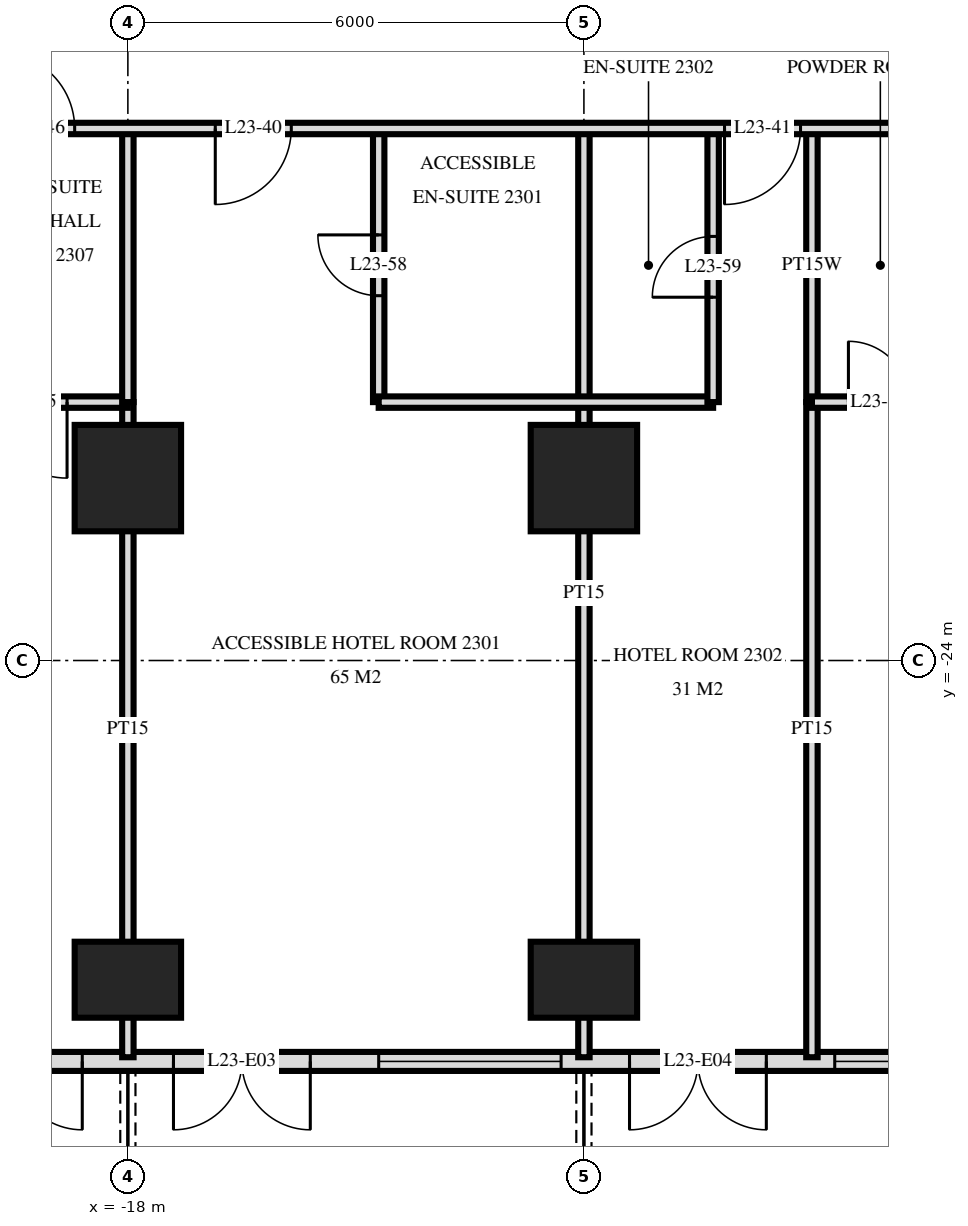
"""IFC4 building model, lengths in metres.
Left out: names, types, materials, properties, quantities, classifications, styles, units other than length and angle.
Written with IfcOpenShell. Run it as: python <this file> out.ifc"""

import sys

from ifc_helpers import new_model, si_unit, direction, frame, frame_2d, origin, origin_2d, place, context, subcontext, project, spatial, rectangle, extrude, element, fill, save


model = new_model("IFC4")
c1 = context("Model", 3, precision=1e-05, world=origin(), true_north=direction((0.0, 1.0)))
c2 = subcontext(c1, "Body", "Model", "MODEL_VIEW")
j1 = project(units=[si_unit("LENGTHUNIT", "METRE"), si_unit("PLANEANGLEUNIT", "RADIAN")], contexts=[c1])
p1 = place(None, origin())
s1 = spatial("IfcSite", under=j1, at=p1, CompositionType="ELEMENT")
p2 = place(p1, origin())
s2 = spatial("IfcBuilding", under=s1, at=p2, CompositionType="ELEMENT")
p3 = place(p2, frame((0.0, 0.0, 92.4)))
s3 = spatial("IfcBuildingStorey", under=s2, at=p3, CompositionType="ELEMENT", Elevation=92.4)
p4 = place(p3, frame((-18.0, -28.2, 0.0), z_axis=(0.0, 0.0, 1.0), x_axis=(1.0, 0.0, 0.0)))
e1 = element("IfcColumn", 1, at=p4, inside=s3, PredefinedType="COLUMN", context=c2, shape_type="SweptSolid", body=[
    extrude(rectangle(XDim=1.4, YDim=1.0, at=origin_2d()), origin(), (0.0, 0.0, 1.0), 3.6),
])
p5 = place(p3, frame((-18.0, -21.6, 0.0), z_axis=(0.0, 0.0, 1.0), x_axis=(1.0, 0.0, 0.0)))
e2 = element("IfcColumn", 2, at=p5, inside=s3, PredefinedType="COLUMN", context=c2, shape_type="SweptSolid", body=[
    extrude(rectangle(XDim=1.4, YDim=1.4, at=origin_2d()), origin(), (0.0, 0.0, 1.0), 3.6),
])
p6 = place(p3, frame((-12.0, -28.2, 0.0), z_axis=(0.0, 0.0, 1.0), x_axis=(1.0, 0.0, 0.0)))
e3 = element("IfcColumn", 3, at=p6, inside=s3, PredefinedType="COLUMN", context=c2, shape_type="SweptSolid", body=[
    extrude(rectangle(XDim=1.4, YDim=1.0, at=origin_2d()), origin(), (0.0, 0.0, 1.0), 3.6),
])
p7 = place(p3, frame((-12.0, -21.6, 0.0), z_axis=(0.0, 0.0, 1.0), x_axis=(1.0, 0.0, 0.0)))
e4 = element("IfcColumn", 4, at=p7, inside=s3, PredefinedType="COLUMN", context=c2, shape_type="SweptSolid", body=[
    extrude(rectangle(XDim=1.4, YDim=1.4, at=origin_2d()), origin(), (0.0, 0.0, 1.0), 3.6),
])
p8 = place(p3, frame((-28.775, -29.275, 0.0), z_axis=(0.0, 0.0, 1.0), x_axis=(1.0, 0.0, 0.0)))
e5 = element("IfcWall", 5, at=p8, inside=s3, PredefinedType="SOLIDWALL", context=c2, shape_type="SweptSolid", body=[
    extrude(rectangle(XDim=57.551, YDim=0.25, at=frame_2d((28.775, 0.0))), origin(), (0.0, 0.0, 1.0), 3.32),
])
p9 = place(p8, frame((0.575, 0.0, 0.0)))
e6 = element("IfcOpeningElement", 6, at=p9, cuts=e5, PredefinedType="OPENING", context=c2, shape_type="SweptSolid", body=[
    extrude(rectangle(XDim=1.8, YDim=2.4, at=frame_2d((0.9, 1.2))), frame((0.0, 0.135, 0.0), z_axis=(0.0, -1.0, 0.0), x_axis=(1.0, 0.0, 0.0)), (0.0, 0.0, 1.0), 0.27),
])
p10 = place(p8, frame((5.075, 0.0, 0.3)))
e7 = element("IfcOpeningElement", 7, at=p10, cuts=e5, PredefinedType="OPENING", context=c2, shape_type="SweptSolid", body=[
    extrude(rectangle(XDim=2.4, YDim=2.1, at=frame_2d((1.2, 1.05))), frame((0.0, 0.135, 0.0), z_axis=(0.0, -1.0, 0.0), x_axis=(1.0, 0.0, 0.0)), (0.0, 0.0, 1.0), 0.27),
])
p11 = place(p8, frame((8.375, 0.0, 0.0)))
e8 = element("IfcOpeningElement", 8, at=p11, cuts=e5, PredefinedType="OPENING", context=c2, shape_type="SweptSolid", body=[
    extrude(rectangle(XDim=1.8, YDim=2.4, at=frame_2d((0.9, 1.2))), frame((0.0, 0.135, 0.0), z_axis=(0.0, -1.0, 0.0), x_axis=(1.0, 0.0, 0.0)), (0.0, 0.0, 1.0), 0.27),
])
p12 = place(p8, frame((11.375, 0.0, 0.0)))
e9 = element("IfcOpeningElement", 9, at=p12, cuts=e5, PredefinedType="OPENING", context=c2, shape_type="SweptSolid", body=[
    extrude(rectangle(XDim=1.8, YDim=2.4, at=frame_2d((0.9, 1.2))), frame((0.0, 0.135, 0.0), z_axis=(0.0, -1.0, 0.0), x_axis=(1.0, 0.0, 0.0)), (0.0, 0.0, 1.0), 0.27),
])
p13 = place(p8, frame((14.075, 0.0, 0.3)))
e10 = element("IfcOpeningElement", 10, at=p13, cuts=e5, PredefinedType="OPENING", context=c2, shape_type="SweptSolid", body=[
    extrude(rectangle(XDim=2.4, YDim=2.1, at=frame_2d((1.2, 1.05))), frame((0.0, 0.135, 0.0), z_axis=(0.0, -1.0, 0.0), x_axis=(1.0, 0.0, 0.0)), (0.0, 0.0, 1.0), 0.27),
])
p14 = place(p8, frame((17.375, 0.0, 0.0)))
e11 = element("IfcOpeningElement", 11, at=p14, cuts=e5, PredefinedType="OPENING", context=c2, shape_type="SweptSolid", body=[
    extrude(rectangle(XDim=1.8, YDim=2.4, at=frame_2d((0.9, 1.2))), frame((0.0, 0.135, 0.0), z_axis=(0.0, -1.0, 0.0), x_axis=(1.0, 0.0, 0.0)), (0.0, 0.0, 1.0), 0.27),
])
p15 = place(p8, frame((20.075, 0.0, 0.3)))
e12 = element("IfcOpeningElement", 12, at=p15, cuts=e5, PredefinedType="OPENING", context=c2, shape_type="SweptSolid", body=[
    extrude(rectangle(XDim=2.4, YDim=2.1, at=frame_2d((1.2, 1.05))), frame((0.0, 0.135, 0.0), z_axis=(0.0, -1.0, 0.0), x_axis=(1.0, 0.0, 0.0)), (0.0, 0.0, 1.0), 0.27),
])
p16 = place(p8, frame((23.075, 0.0, 0.3)))
e13 = element("IfcOpeningElement", 13, at=p16, cuts=e5, PredefinedType="OPENING", context=c2, shape_type="SweptSolid", body=[
    extrude(rectangle(XDim=2.4, YDim=2.1, at=frame_2d((1.2, 1.05))), frame((0.0, 0.135, 0.0), z_axis=(0.0, -1.0, 0.0), x_axis=(1.0, 0.0, 0.0)), (0.0, 0.0, 1.0), 0.27),
])
p17 = place(p8, frame((26.375, 0.0, 0.0)))
e14 = element("IfcOpeningElement", 14, at=p17, cuts=e5, PredefinedType="OPENING", context=c2, shape_type="SweptSolid", body=[
    extrude(rectangle(XDim=1.8, YDim=2.4, at=frame_2d((0.9, 1.2))), frame((0.0, 0.135, 0.0), z_axis=(0.0, -1.0, 0.0), x_axis=(1.0, 0.0, 0.0)), (0.0, 0.0, 1.0), 0.27),
])
p18 = place(p8, frame((29.375, 0.0, 0.0)))
e15 = element("IfcOpeningElement", 15, at=p18, cuts=e5, PredefinedType="OPENING", context=c2, shape_type="SweptSolid", body=[
    extrude(rectangle(XDim=1.8, YDim=2.4, at=frame_2d((0.9, 1.2))), frame((0.0, 0.135, 0.0), z_axis=(0.0, -1.0, 0.0), x_axis=(1.0, 0.0, 0.0)), (0.0, 0.0, 1.0), 0.27),
])
p19 = place(p8, frame((32.075, 0.0, 0.3)))
e16 = element("IfcOpeningElement", 16, at=p19, cuts=e5, PredefinedType="OPENING", context=c2, shape_type="SweptSolid", body=[
    extrude(rectangle(XDim=2.4, YDim=2.1, at=frame_2d((1.2, 1.05))), frame((0.0, 0.135, 0.0), z_axis=(0.0, -1.0, 0.0), x_axis=(1.0, 0.0, 0.0)), (0.0, 0.0, 1.0), 0.27),
])
p20 = place(p8, frame((35.375, 0.0, 0.0)))
e17 = element("IfcOpeningElement", 17, at=p20, cuts=e5, PredefinedType="OPENING", context=c2, shape_type="SweptSolid", body=[
    extrude(rectangle(XDim=1.8, YDim=2.4, at=frame_2d((0.9, 1.2))), frame((0.0, 0.135, 0.0), z_axis=(0.0, -1.0, 0.0), x_axis=(1.0, 0.0, 0.0)), (0.0, 0.0, 1.0), 0.27),
])
p21 = place(p8, frame((38.075, 0.0, 0.3)))
e18 = element("IfcOpeningElement", 18, at=p21, cuts=e5, PredefinedType="OPENING", context=c2, shape_type="SweptSolid", body=[
    extrude(rectangle(XDim=2.4, YDim=2.1, at=frame_2d((1.2, 1.05))), frame((0.0, 0.135, 0.0), z_axis=(0.0, -1.0, 0.0), x_axis=(1.0, 0.0, 0.0)), (0.0, 0.0, 1.0), 0.27),
])
p22 = place(p8, frame((41.075, 0.0, 0.3)))
e19 = element("IfcOpeningElement", 19, at=p22, cuts=e5, PredefinedType="OPENING", context=c2, shape_type="SweptSolid", body=[
    extrude(rectangle(XDim=2.4, YDim=2.1, at=frame_2d((1.2, 1.05))), frame((0.0, 0.135, 0.0), z_axis=(0.0, -1.0, 0.0), x_axis=(1.0, 0.0, 0.0)), (0.0, 0.0, 1.0), 0.27),
])
p23 = place(p8, frame((44.375, 0.0, 0.0)))
e20 = element("IfcOpeningElement", 20, at=p23, cuts=e5, PredefinedType="OPENING", context=c2, shape_type="SweptSolid", body=[
    extrude(rectangle(XDim=1.8, YDim=2.4, at=frame_2d((0.9, 1.2))), frame((0.0, 0.135, 0.0), z_axis=(0.0, -1.0, 0.0), x_axis=(1.0, 0.0, 0.0)), (0.0, 0.0, 1.0), 0.27),
])
p24 = place(p8, frame((47.075, 0.0, 0.3)))
e21 = element("IfcOpeningElement", 21, at=p24, cuts=e5, PredefinedType="OPENING", context=c2, shape_type="SweptSolid", body=[
    extrude(rectangle(XDim=2.4, YDim=2.1, at=frame_2d((1.2, 1.05))), frame((0.0, 0.135, 0.0), z_axis=(0.0, -1.0, 0.0), x_axis=(1.0, 0.0, 0.0)), (0.0, 0.0, 1.0), 0.27),
])
p25 = place(p8, frame((50.375, 0.0, 0.0)))
e22 = element("IfcOpeningElement", 22, at=p25, cuts=e5, PredefinedType="OPENING", context=c2, shape_type="SweptSolid", body=[
    extrude(rectangle(XDim=1.8, YDim=2.4, at=frame_2d((0.9, 1.2))), frame((0.0, 0.135, 0.0), z_axis=(0.0, -1.0, 0.0), x_axis=(1.0, 0.0, 0.0)), (0.0, 0.0, 1.0), 0.27),
])
p26 = place(p8, frame((53.375, 0.0, 0.0)))
e23 = element("IfcOpeningElement", 23, at=p26, cuts=e5, PredefinedType="OPENING", context=c2, shape_type="SweptSolid", body=[
    extrude(rectangle(XDim=1.8, YDim=2.4, at=frame_2d((0.9, 1.2))), frame((0.0, 0.135, 0.0), z_axis=(0.0, -1.0, 0.0), x_axis=(1.0, 0.0, 0.0)), (0.0, 0.0, 1.0), 0.27),
])
p27 = place(p3, frame((-9.0, -29.22, 0.0), z_axis=(0.0, 0.0, 1.0), x_axis=(0.0, 1.0, 0.0)))
e24 = element("IfcWall", 24, at=p27, inside=s3, PredefinedType="PARTITIONING", context=c2, shape_type="SweptSolid", body=[
    extrude(rectangle(XDim=8.62, YDim=0.15, at=frame_2d((4.31, 0.0))), origin(), (0.0, 0.0, 1.0), 3.32),
])
p28 = place(p3, frame((-9.0, -20.6, 0.0), z_axis=(0.0, 0.0, 1.0), x_axis=(0.0, 1.0, 0.0)))
e25 = element("IfcWall", 25, at=p28, inside=s3, PredefinedType="PLUMBINGWALL", context=c2, shape_type="SweptSolid", body=[
    extrude(rectangle(XDim=3.6, YDim=0.15, at=frame_2d((1.8, 0.0))), origin(), (0.0, 0.0, 1.0), 3.32),
])
p29 = place(p3, frame((-10.3, -20.6, 0.0), z_axis=(0.0, 0.0, 1.0), x_axis=(0.0, 1.0, 0.0)))
e26 = element("IfcWall", 26, at=p29, inside=s3, PredefinedType="PARTITIONING", context=c2, shape_type="SweptSolid", body=[
    extrude(rectangle(XDim=3.6, YDim=0.15, at=frame_2d((1.8, 0.0))), origin(), (0.0, 0.0, 1.0), 3.32),
])
p30 = place(p29, frame((1.38, 0.0, 0.0)))
e27 = element("IfcOpeningElement", 27, at=p30, cuts=e26, PredefinedType="OPENING", context=c2, shape_type="SweptSolid", body=[
    extrude(rectangle(XDim=0.8, YDim=2.1, at=frame_2d((0.4, 1.05))), frame((0.0, 0.085, 0.0), z_axis=(0.0, -1.0, 0.0), x_axis=(1.0, 0.0, 0.0)), (0.0, 0.0, 1.0), 0.17),
])
p31 = place(p3, frame((-12.0, -29.22, 0.0), z_axis=(0.0, 0.0, 1.0), x_axis=(0.0, 1.0, 0.0)))
e28 = element("IfcWall", 28, at=p31, inside=s3, PredefinedType="PARTITIONING", context=c2, shape_type="SweptSolid", body=[
    extrude(rectangle(XDim=12.22, YDim=0.15, at=frame_2d((6.11, 0.0))), origin(), (0.0, 0.0, 1.0), 3.32),
])
p32 = place(p3, frame((-14.7, -20.6, 0.0), z_axis=(0.0, 0.0, 1.0), x_axis=(0.0, 1.0, 0.0)))
e29 = element("IfcWall", 29, at=p32, inside=s3, PredefinedType="PARTITIONING", context=c2, shape_type="SweptSolid", body=[
    extrude(rectangle(XDim=3.6, YDim=0.15, at=frame_2d((1.8, 0.0))), origin(), (0.0, 0.0, 1.0), 3.32),
])
p33 = place(p32, frame((1.4, 0.0, 0.0)))
e30 = element("IfcOpeningElement", 30, at=p33, cuts=e29, PredefinedType="OPENING", context=c2, shape_type="SweptSolid", body=[
    extrude(rectangle(XDim=0.8, YDim=2.1, at=frame_2d((0.4, 1.05))), frame((0.0, 0.085, 0.0), z_axis=(0.0, -1.0, 0.0), x_axis=(1.0, 0.0, 0.0)), (0.0, 0.0, 1.0), 0.17),
])
p34 = place(p3, frame((-18.0, -20.6, 0.0), z_axis=(0.0, 0.0, 1.0), x_axis=(0.0, 1.0, 0.0)))
e31 = element("IfcWall", 31, at=p34, inside=s3, PredefinedType="PARTITIONING", context=c2, shape_type="SweptSolid", body=[
    extrude(rectangle(XDim=3.6, YDim=0.15, at=frame_2d((1.8, 0.0))), origin(), (0.0, 0.0, 1.0), 3.32),
])
p35 = place(p3, frame((-18.0, -29.22, 0.0), z_axis=(0.0, 0.0, 1.0), x_axis=(0.0, 1.0, 0.0)))
e32 = element("IfcWall", 32, at=p35, inside=s3, PredefinedType="PARTITIONING", context=c2, shape_type="SweptSolid", body=[
    extrude(rectangle(XDim=8.62, YDim=0.15, at=frame_2d((4.31, 0.0))), origin(), (0.0, 0.0, 1.0), 3.32),
])
p36 = place(p3, frame((-20.4, -20.6, 0.0), z_axis=(0.0, 0.0, 1.0), x_axis=(1.0, 0.0, 0.0)))
e33 = element("IfcWall", 33, at=p36, inside=s3, PredefinedType="PARTITIONING", context=c2, shape_type="SweptSolid", body=[
    extrude(rectangle(XDim=2.4, YDim=0.15, at=frame_2d((1.2, 0.0))), origin(), (0.0, 0.0, 1.0), 3.32),
])
p37 = place(p36, frame((0.6, 0.0, 0.0)))
e34 = element("IfcOpeningElement", 34, at=p37, cuts=e33, PredefinedType="OPENING", context=c2, shape_type="SweptSolid", body=[
    extrude(rectangle(XDim=1.0, YDim=2.1, at=frame_2d((0.5, 1.05))), frame((0.0, 0.085, 0.0), z_axis=(0.0, -1.0, 0.0), x_axis=(1.0, 0.0, 0.0)), (0.0, 0.0, 1.0), 0.17),
])
p38 = place(p3, frame((-14.7, -20.6, 0.0), z_axis=(0.0, 0.0, 1.0), x_axis=(1.0, 0.0, 0.0)))
e35 = element("IfcWall", 35, at=p38, inside=s3, PredefinedType="PARTITIONING", context=c2, shape_type="SweptSolid", body=[
    extrude(rectangle(XDim=4.4, YDim=0.15, at=frame_2d((2.2, 0.0))), origin(), (0.0, 0.0, 1.0), 3.32),
])
p39 = place(p3, frame((-9.0, -20.6, 0.0), z_axis=(0.0, 0.0, 1.0), x_axis=(1.0, 0.0, 0.0)))
e36 = element("IfcWall", 36, at=p39, inside=s3, PredefinedType="PLUMBINGWALL", context=c2, shape_type="SweptSolid", body=[
    extrude(rectangle(XDim=1.8, YDim=0.15, at=frame_2d((0.9, 0.0))), origin(), (0.0, 0.0, 1.0), 3.32),
])
p40 = place(p39, frame((0.48, 0.0, 0.0)))
e37 = element("IfcOpeningElement", 37, at=p40, cuts=e36, PredefinedType="OPENING", context=c2, shape_type="SweptSolid", body=[
    extrude(rectangle(XDim=0.8, YDim=2.1, at=frame_2d((0.4, 1.05))), frame((0.0, 0.085, 0.0), z_axis=(0.0, -1.0, 0.0), x_axis=(1.0, 0.0, 0.0)), (0.0, 0.0, 1.0), 0.17),
])
p41 = place(p3, frame((-33.12, -17.0, 0.0), z_axis=(0.0, 0.0, 1.0), x_axis=(1.0, 0.0, 0.0)))
e38 = element("IfcWall", 38, at=p41, inside=s3, PredefinedType="PARTITIONING", context=c2, shape_type="SweptSolid", body=[
    extrude(rectangle(XDim=66.24, YDim=0.15, at=frame_2d((33.12, 0.0))), origin(), (0.0, 0.0, 1.0), 3.32),
])
p42 = place(p41, frame((16.27, 0.0, 0.0)))
e39 = element("IfcOpeningElement", 39, at=p42, cuts=e38, PredefinedType="OPENING", context=c2, shape_type="SweptSolid", body=[
    extrude(rectangle(XDim=1.0, YDim=2.1, at=frame_2d((0.5, 1.05))), frame((0.0, 0.085, 0.0), z_axis=(0.0, -1.0, 0.0), x_axis=(1.0, 0.0, 0.0)), (0.0, 0.0, 1.0), 0.17),
])
p43 = place(p41, frame((22.97, 0.0, 0.0)))
e40 = element("IfcOpeningElement", 40, at=p43, cuts=e38, PredefinedType="OPENING", context=c2, shape_type="SweptSolid", body=[
    extrude(rectangle(XDim=1.0, YDim=2.1, at=frame_2d((0.5, 1.05))), frame((0.0, 0.085, 0.0), z_axis=(0.0, -1.0, 0.0), x_axis=(1.0, 0.0, 0.0)), (0.0, 0.0, 1.0), 0.17),
])
p44 = place(p41, frame((34.42, 0.0, 0.0)))
e41 = element("IfcOpeningElement", 41, at=p44, cuts=e38, PredefinedType="OPENING", context=c2, shape_type="SweptSolid", body=[
    extrude(rectangle(XDim=1.0, YDim=2.1, at=frame_2d((0.5, 1.05))), frame((0.0, 0.085, 0.0), z_axis=(0.0, -1.0, 0.0), x_axis=(1.0, 0.0, 0.0)), (0.0, 0.0, 1.0), 0.17),
])
p45 = place(p41, frame((39.22, 0.0, 0.0)))
e42 = element("IfcOpeningElement", 42, at=p45, cuts=e38, PredefinedType="OPENING", context=c2, shape_type="SweptSolid", body=[
    extrude(rectangle(XDim=1.0, YDim=2.1, at=frame_2d((0.5, 1.05))), frame((0.0, 0.085, 0.0), z_axis=(0.0, -1.0, 0.0), x_axis=(1.0, 0.0, 0.0)), (0.0, 0.0, 1.0), 0.17),
])
p46 = place(p41, frame((42.27, 0.0, 0.0)))
e43 = element("IfcOpeningElement", 43, at=p46, cuts=e38, PredefinedType="OPENING", context=c2, shape_type="SweptSolid", body=[
    extrude(rectangle(XDim=1.0, YDim=2.1, at=frame_2d((0.5, 1.05))), frame((0.0, 0.085, 0.0), z_axis=(0.0, -1.0, 0.0), x_axis=(1.0, 0.0, 0.0)), (0.0, 0.0, 1.0), 0.17),
])
p47 = place(p41, frame((45.82, 0.0, 0.0)))
e44 = element("IfcOpeningElement", 44, at=p47, cuts=e38, PredefinedType="OPENING", context=c2, shape_type="SweptSolid", body=[
    extrude(rectangle(XDim=1.0, YDim=2.1, at=frame_2d((0.5, 1.05))), frame((0.0, 0.085, 0.0), z_axis=(0.0, -1.0, 0.0), x_axis=(1.0, 0.0, 0.0)), (0.0, 0.0, 1.0), 0.17),
])
p48 = place(p41, frame((13.42, 0.0, 0.0)))
e45 = element("IfcOpeningElement", 45, at=p48, cuts=e38, PredefinedType="OPENING", context=c2, shape_type="SweptSolid", body=[
    extrude(rectangle(XDim=1.0, YDim=2.1, at=frame_2d((0.5, 1.05))), frame((0.0, 0.085, 0.0), z_axis=(0.0, -1.0, 0.0), x_axis=(1.0, 0.0, 0.0)), (0.0, 0.0, 1.0), 0.17),
])
p49 = place(p41, frame((54.82, 0.0, 0.0)))
e46 = element("IfcOpeningElement", 46, at=p49, cuts=e38, PredefinedType="OPENING", context=c2, shape_type="SweptSolid", body=[
    extrude(rectangle(XDim=1.0, YDim=2.1, at=frame_2d((0.5, 1.05))), frame((0.0, 0.085, 0.0), z_axis=(0.0, -1.0, 0.0), x_axis=(1.0, 0.0, 0.0)), (0.0, 0.0, 1.0), 0.17),
])
p50 = place(p11, frame((0.9, 0.0, 0.0), z_axis=(0.0, 0.0, 1.0), x_axis=(-1.0, 0.0, 0.0)))
e47 = element("IfcDoor", 47, at=p50, inside=s3, OperationType="DOUBLE_DOOR_SINGLE_SWING", PredefinedType="DOOR", context=c2, shape_type="SweptSolid", body=[
    extrude(rectangle(XDim=1.8, YDim=2.4, at=frame_2d((0.0, 1.2))), frame((0.0, -0.025, 0.0), z_axis=(0.0, 1.0, 0.0), x_axis=(-1.0, 0.0, 0.0)), (0.0, 0.0, 1.0), 0.05),
])
fill(e8, e47)
p51 = place(p12, frame((0.9, 0.0, 0.0), z_axis=(0.0, 0.0, 1.0), x_axis=(-1.0, 0.0, 0.0)))
e48 = element("IfcDoor", 48, at=p51, inside=s3, OperationType="DOUBLE_DOOR_SINGLE_SWING", PredefinedType="DOOR", context=c2, shape_type="SweptSolid", body=[
    extrude(rectangle(XDim=1.8, YDim=2.4, at=frame_2d((0.0, 1.2))), frame((0.0, -0.025, 0.0), z_axis=(0.0, 1.0, 0.0), x_axis=(-1.0, 0.0, 0.0)), (0.0, 0.0, 1.0), 0.05),
])
fill(e9, e48)
p52 = place(p13, origin())
e49 = element("IfcWindow", 49, at=p52, inside=s3, PartitioningType="SINGLE_PANEL", PredefinedType="WINDOW", context=c2, shape_type="SweptSolid", body=[
    extrude(rectangle(XDim=2.4, YDim=2.1, at=frame_2d((1.2, 1.05))), frame((0.0, 0.03, 0.0), z_axis=(0.0, -1.0, 0.0), x_axis=(1.0, 0.0, 0.0)), (0.0, 0.0, 1.0), 0.06),
])
fill(e10, e49)
p53 = place(p14, frame((0.9, 0.0, 0.0), z_axis=(0.0, 0.0, 1.0), x_axis=(-1.0, 0.0, 0.0)))
e50 = element("IfcDoor", 50, at=p53, inside=s3, OperationType="DOUBLE_DOOR_SINGLE_SWING", PredefinedType="DOOR", context=c2, shape_type="SweptSolid", body=[
    extrude(rectangle(XDim=1.8, YDim=2.4, at=frame_2d((0.0, 1.2))), frame((0.0, -0.025, 0.0), z_axis=(0.0, 1.0, 0.0), x_axis=(-1.0, 0.0, 0.0)), (0.0, 0.0, 1.0), 0.05),
])
fill(e11, e50)
p54 = place(p15, origin())
e51 = element("IfcWindow", 51, at=p54, inside=s3, PartitioningType="SINGLE_PANEL", PredefinedType="WINDOW", context=c2, shape_type="SweptSolid", body=[
    extrude(rectangle(XDim=2.4, YDim=2.1, at=frame_2d((1.2, 1.05))), frame((0.0, 0.03, 0.0), z_axis=(0.0, -1.0, 0.0), x_axis=(1.0, 0.0, 0.0)), (0.0, 0.0, 1.0), 0.06),
])
fill(e12, e51)
p55 = place(p42, frame((0.5, 0.0, 0.0), z_axis=(0.0, 0.0, 1.0), x_axis=(-1.0, 0.0, 0.0)))
e52 = element("IfcDoor", 52, at=p55, inside=s3, OperationType="SINGLE_SWING_LEFT", PredefinedType="DOOR", context=c2, shape_type="SweptSolid", body=[
    extrude(rectangle(XDim=1.0, YDim=2.1, at=frame_2d((0.0, 1.05))), frame((0.0, -0.025, 0.0), z_axis=(0.0, 1.0, 0.0), x_axis=(-1.0, 0.0, 0.0)), (0.0, 0.0, 1.0), 0.05),
])
fill(e39, e52)
p56 = place(p43, frame((0.5, 0.0, 0.0), z_axis=(0.0, 0.0, 1.0), x_axis=(-1.0, 0.0, 0.0)))
e53 = element("IfcDoor", 53, at=p56, inside=s3, OperationType="SINGLE_SWING_LEFT", PredefinedType="DOOR", context=c2, shape_type="SweptSolid", body=[
    extrude(rectangle(XDim=1.0, YDim=2.1, at=frame_2d((0.0, 1.05))), frame((0.0, -0.025, 0.0), z_axis=(0.0, 1.0, 0.0), x_axis=(-1.0, 0.0, 0.0)), (0.0, 0.0, 1.0), 0.05),
])
fill(e40, e53)
p57 = place(p48, origin())
e54 = element("IfcDoor", 54, at=p57, inside=s3, OperationType="SINGLE_SWING_RIGHT", PredefinedType="DOOR", context=c2, shape_type="SweptSolid", body=[
    extrude(rectangle(XDim=1.0, YDim=2.1, at=frame_2d((0.5, 1.05))), frame((0.0, 0.025, 0.0), z_axis=(0.0, -1.0, 0.0), x_axis=(1.0, 0.0, 0.0)), (0.0, 0.0, 1.0), 0.05),
])
fill(e45, e54)
p58 = place(p33, origin())
e55 = element("IfcDoor", 55, at=p58, inside=s3, OperationType="SINGLE_SWING_LEFT", PredefinedType="DOOR", context=c2, shape_type="SweptSolid", body=[
    extrude(rectangle(XDim=0.8, YDim=2.1, at=frame_2d((0.4, 1.05))), frame((0.0, 0.025, 0.0), z_axis=(0.0, -1.0, 0.0), x_axis=(1.0, 0.0, 0.0)), (0.0, 0.0, 1.0), 0.05),
])
fill(e30, e55)
p59 = place(p30, origin())
e56 = element("IfcDoor", 56, at=p59, inside=s3, OperationType="SINGLE_SWING_RIGHT", PredefinedType="DOOR", context=c2, shape_type="SweptSolid", body=[
    extrude(rectangle(XDim=0.8, YDim=2.1, at=frame_2d((0.4, 1.05))), frame((0.0, 0.025, 0.0), z_axis=(0.0, -1.0, 0.0), x_axis=(1.0, 0.0, 0.0)), (0.0, 0.0, 1.0), 0.05),
])
fill(e27, e56)
p60 = place(p40, origin())
e57 = element("IfcDoor", 57, at=p60, inside=s3, OperationType="SINGLE_SWING_RIGHT", PredefinedType="DOOR", context=c2, shape_type="SweptSolid", body=[
    extrude(rectangle(XDim=0.8, YDim=2.1, at=frame_2d((0.4, 1.05))), frame((0.0, 0.025, 0.0), z_axis=(0.0, -1.0, 0.0), x_axis=(1.0, 0.0, 0.0)), (0.0, 0.0, 1.0), 0.05),
])
fill(e37, e57)
p61 = place(p37, frame((0.5, 0.0, 0.0), z_axis=(0.0, 0.0, 1.0), x_axis=(-1.0, 0.0, 0.0)))
e58 = element("IfcDoor", 58, at=p61, inside=s3, OperationType="SINGLE_SWING_RIGHT", PredefinedType="DOOR", context=c2, shape_type="SweptSolid", body=[
    extrude(rectangle(XDim=1.0, YDim=2.1, at=frame_2d((0.0, 1.05))), frame((0.0, -0.025, 0.0), z_axis=(0.0, 1.0, 0.0), x_axis=(-1.0, 0.0, 0.0)), (0.0, 0.0, 1.0), 0.05),
])
fill(e34, e58)
save(model, sys.argv[1])
